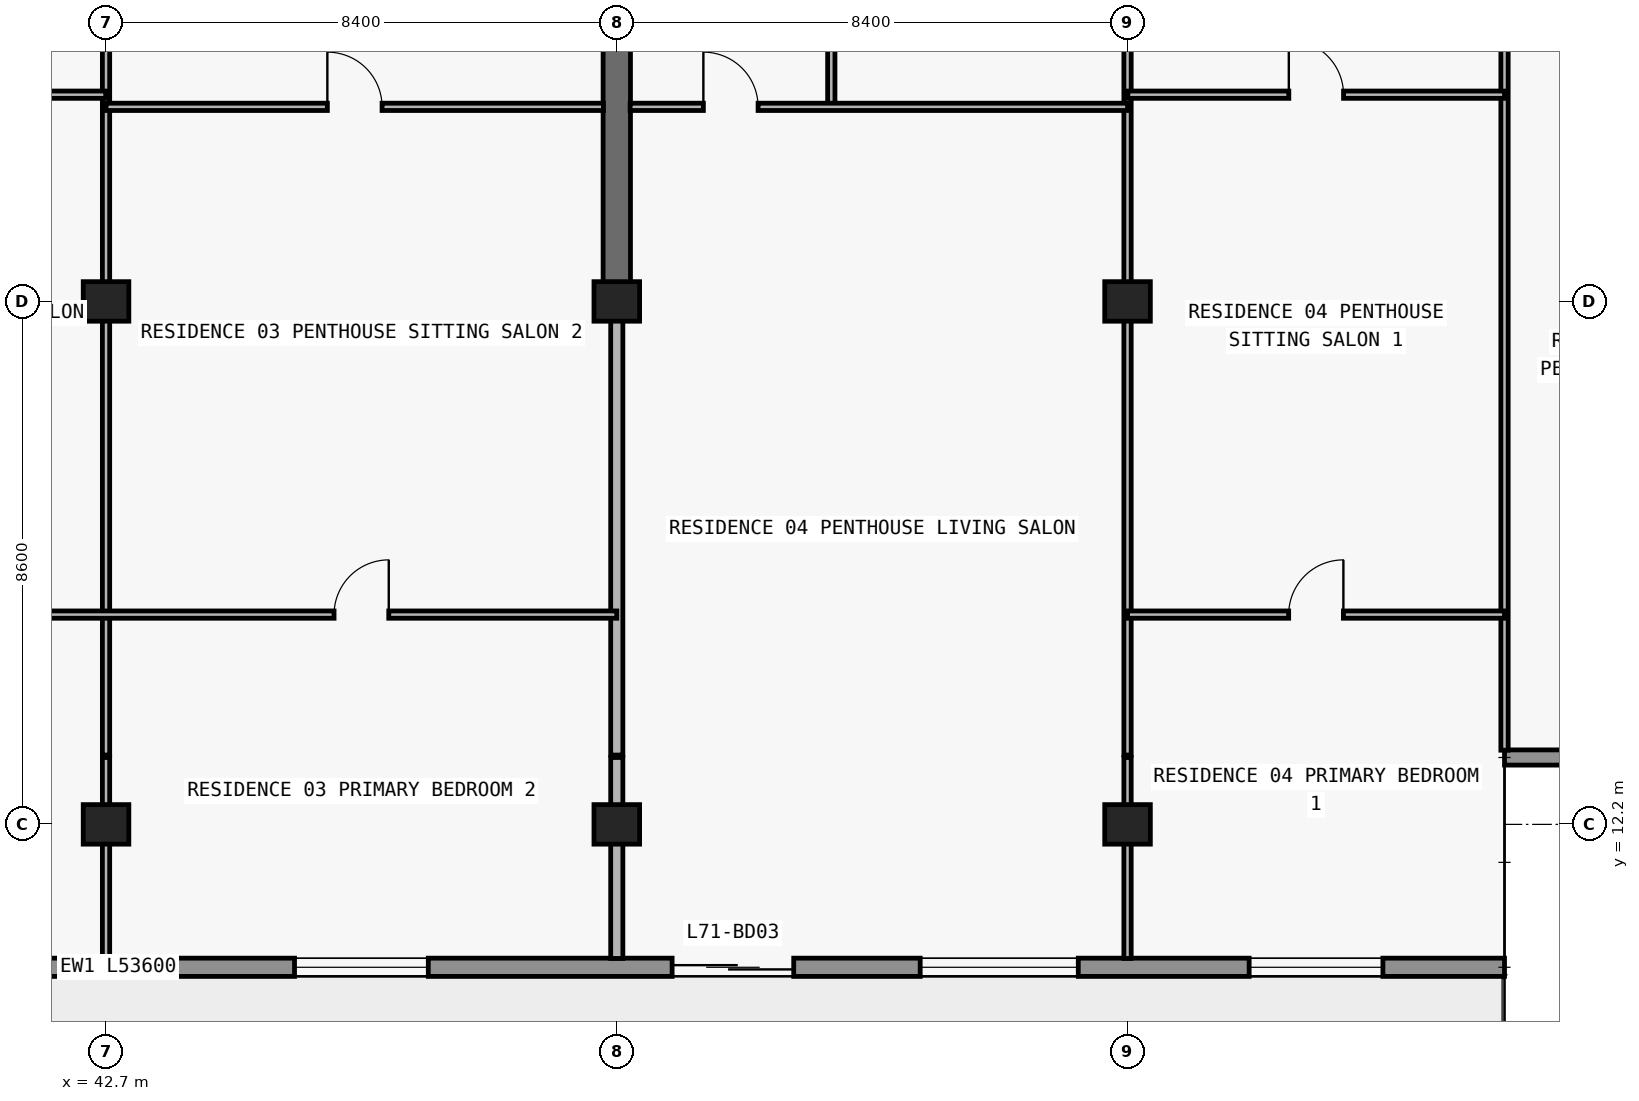
"""IFC4 building model, lengths in metres.
Left out: names, types, materials, properties, quantities, classifications, styles, units other than length and angle.
Written with IfcOpenShell. Run it as: python <this file> out.ifc"""

import sys

from ifc_helpers import new_model, si_unit, direction, frame, frame_2d, origin, origin_2d, place, context, subcontext, project, spatial, rectangle, extrude, element, fill, save


model = new_model("IFC4")
c1 = context("Model", 3, precision=1e-05, world=origin(), true_north=direction((0.0, 1.0)))
c2 = subcontext(c1, "Body", "Model", "MODEL_VIEW")
j1 = project(units=[si_unit("LENGTHUNIT", "METRE"), si_unit("PLANEANGLEUNIT", "RADIAN")], contexts=[c1])
p1 = place(None, origin())
s1 = spatial("IfcSite", under=j1, at=p1, CompositionType="ELEMENT")
p2 = place(p1, origin())
s2 = spatial("IfcBuilding", under=s1, at=p2, CompositionType="ELEMENT")
p3 = place(p2, frame((0.0, 0.0, 252.9)))
s3 = spatial("IfcBuildingStorey", under=s2, at=p3, CompositionType="ELEMENT", Elevation=252.9)
for number, where, z_axis, x_axis in (
    (1, (42.7, 12.2, 0.0), (0.0, 0.0, 1.0), (1.0, 0.0, 0.0)),
    (2, (51.1, 12.2, 0.0), (0.0, 0.0, 1.0), (1.0, 0.0, 0.0)),
    (3, (59.5, 12.2, 0.0), (0.0, 0.0, 1.0), (1.0, 0.0, 0.0)),
    (4, (42.7, 20.8, 0.0), (0.0, 0.0, 1.0), (1.0, 0.0, 0.0)),
    (5, (51.1, 20.8, 0.0), (0.0, 0.0, 1.0), (1.0, 0.0, 0.0)),
    (6, (59.5, 20.8, 0.0), (0.0, 0.0, 1.0), (1.0, 0.0, 0.0)),
):
    element("IfcColumn", number, at=place(p3, frame(where, z_axis=z_axis, x_axis=x_axis)), inside=s3, PredefinedType="COLUMN", context=c2, shape_type="SweptSolid", body=[
        extrude(rectangle(XDim=0.75, YDim=0.65, at=origin_2d()), origin(), (0.0, 0.0, 1.0), 3.05),
    ])
p4 = place(p3, frame((51.1, 20.8, 0.0), z_axis=(0.0, 0.0, 1.0), x_axis=(0.0, 1.0, 0.0)))
e7 = element("IfcWall", 7, at=p4, inside=s3, PredefinedType="SHEAR", context=c2, shape_type="SweptSolid", body=[
    extrude(rectangle(XDim=8.6, YDim=0.45, at=frame_2d((4.3, 0.0))), origin(), (0.0, 0.0, 1.0), 3.05),
])
p5 = place(p3, frame((65.7, 9.85, 0.0), z_axis=(0.0, 0.0, 1.0), x_axis=(-1.0, 0.0, 0.0)))
e8 = element("IfcWall", 8, at=p5, inside=s3, PredefinedType="STANDARD", context=c2, shape_type="SweptSolid", body=[
    extrude(rectangle(XDim=53.6, YDim=0.3, at=frame_2d((26.8, 0.0))), origin(), (0.0, 0.0, 1.0), 3.05),
])
p6 = place(p5, frame((48.05, 0.0, 0.85)))
e9 = element("IfcOpeningElement", 9, at=p6, cuts=e8, PredefinedType="OPENING", context=c2, shape_type="SweptSolid", body=[
    extrude(rectangle(XDim=1.8, YDim=1.55, at=frame_2d((0.9, 0.775))), frame((0.0, 0.16, 0.0), z_axis=(0.0, -1.0, 0.0), x_axis=(1.0, 0.0, 0.0)), (0.0, 0.0, 1.0), 0.32),
])
p7 = place(p5, frame((44.09, 0.0, 0.0)))
e10 = element("IfcOpeningElement", 10, at=p7, cuts=e8, PredefinedType="OPENING", context=c2, shape_type="SweptSolid", body=[
    extrude(rectangle(XDim=2.0, YDim=2.3, at=frame_2d((1.0, 1.15))), frame((0.0, 0.16, 0.0), z_axis=(0.0, -1.0, 0.0), x_axis=(1.0, 0.0, 0.0)), (0.0, 0.0, 1.0), 0.32),
])
p8 = place(p5, frame((39.99, 0.0, 0.85)))
e11 = element("IfcOpeningElement", 11, at=p8, cuts=e8, PredefinedType="OPENING", context=c2, shape_type="SweptSolid", body=[
    extrude(rectangle(XDim=1.8, YDim=1.55, at=frame_2d((0.9, 0.775))), frame((0.0, 0.16, 0.0), z_axis=(0.0, -1.0, 0.0), x_axis=(1.0, 0.0, 0.0)), (0.0, 0.0, 1.0), 0.32),
])
p9 = place(p5, frame((36.09, 0.0, 0.0)))
e12 = element("IfcOpeningElement", 12, at=p9, cuts=e8, PredefinedType="OPENING", context=c2, shape_type="SweptSolid", body=[
    extrude(rectangle(XDim=2.0, YDim=2.3, at=frame_2d((1.0, 1.15))), frame((0.0, 0.16, 0.0), z_axis=(0.0, -1.0, 0.0), x_axis=(1.0, 0.0, 0.0)), (0.0, 0.0, 1.0), 0.32),
])
p10 = place(p5, frame((31.41, 0.0, 0.65)))
e13 = element("IfcOpeningElement", 13, at=p10, cuts=e8, PredefinedType="OPENING", context=c2, shape_type="SweptSolid", body=[
    extrude(rectangle(XDim=2.6, YDim=1.85, at=frame_2d((1.3, 0.925))), frame((0.0, 0.16, 0.0), z_axis=(0.0, -1.0, 0.0), x_axis=(1.0, 0.0, 0.0)), (0.0, 0.0, 1.0), 0.32),
])
p11 = place(p5, frame((25.7, 0.0, 0.85)))
e14 = element("IfcOpeningElement", 14, at=p11, cuts=e8, PredefinedType="OPENING", context=c2, shape_type="SweptSolid", body=[
    extrude(rectangle(XDim=2.2, YDim=1.55, at=frame_2d((1.1, 0.775))), frame((0.0, 0.16, 0.0), z_axis=(0.0, -1.0, 0.0), x_axis=(1.0, 0.0, 0.0)), (0.0, 0.0, 1.0), 0.32),
])
p12 = place(p5, frame((17.7, 0.0, 0.85)))
e15 = element("IfcOpeningElement", 15, at=p12, cuts=e8, PredefinedType="OPENING", context=c2, shape_type="SweptSolid", body=[
    extrude(rectangle(XDim=2.2, YDim=1.55, at=frame_2d((1.1, 0.775))), frame((0.0, 0.16, 0.0), z_axis=(0.0, -1.0, 0.0), x_axis=(1.0, 0.0, 0.0)), (0.0, 0.0, 1.0), 0.32),
])
p13 = place(p5, frame((11.69, 0.0, 0.0)))
e16 = element("IfcOpeningElement", 16, at=p13, cuts=e8, PredefinedType="OPENING", context=c2, shape_type="SweptSolid", body=[
    extrude(rectangle(XDim=2.0, YDim=2.3, at=frame_2d((1.0, 1.15))), frame((0.0, 0.16, 0.0), z_axis=(0.0, -1.0, 0.0), x_axis=(1.0, 0.0, 0.0)), (0.0, 0.0, 1.0), 0.32),
])
p14 = place(p5, frame((7.01, 0.0, 0.65)))
e17 = element("IfcOpeningElement", 17, at=p14, cuts=e8, PredefinedType="OPENING", context=c2, shape_type="SweptSolid", body=[
    extrude(rectangle(XDim=2.6, YDim=1.85, at=frame_2d((1.3, 0.925))), frame((0.0, 0.16, 0.0), z_axis=(0.0, -1.0, 0.0), x_axis=(1.0, 0.0, 0.0)), (0.0, 0.0, 1.0), 0.32),
])
p15 = place(p5, frame((2.0, 0.0, 0.85)))
e18 = element("IfcOpeningElement", 18, at=p15, cuts=e8, PredefinedType="OPENING", context=c2, shape_type="SweptSolid", body=[
    extrude(rectangle(XDim=2.2, YDim=1.55, at=frame_2d((1.1, 0.775))), frame((0.0, 0.16, 0.0), z_axis=(0.0, -1.0, 0.0), x_axis=(1.0, 0.0, 0.0)), (0.0, 0.0, 1.0), 0.32),
])
p16 = place(p3, frame((65.7, 13.3, 0.0), z_axis=(0.0, 0.0, 1.0), x_axis=(1.0, 0.0, 0.0)))
e19 = element("IfcWall", 19, at=p16, inside=s3, PredefinedType="ELEMENTEDWALL", context=c2, shape_type="SweptSolid", body=[
    extrude(rectangle(XDim=3.85, YDim=0.25, at=frame_2d((1.925, 0.0))), origin(), (0.0, 0.0, 1.0), 3.05),
])
p17 = place(p3, frame((42.7, 9.995, 0.0), z_axis=(0.0, 0.0, 1.0), x_axis=(0.0, 1.0, 0.0)))
e20 = element("IfcWall", 20, at=p17, inside=s3, PredefinedType="PARTITIONING", context=c2, shape_type="SweptSolid", body=[
    extrude(rectangle(XDim=3.305, YDim=0.12, at=frame_2d((1.652, 0.0))), origin(), (0.0, 0.0, 1.0), 2.263),
])
p18 = place(p3, frame((42.7, 13.34, 0.0), z_axis=(0.0, 0.0, 1.0), x_axis=(0.0, 1.0, 0.0)))
e21 = element("IfcWall", 21, at=p18, inside=s3, PredefinedType="PARTITIONING", context=c2, shape_type="SweptSolid", body=[
    extrude(rectangle(XDim=16.8, YDim=0.12, at=frame_2d((8.4, 0.0))), origin(), (0.0, 0.0, 1.0), 2.263),
])
p19 = place(p18, frame((12.61, 0.0, 0.0)))
e22 = element("IfcOpeningElement", 22, at=p19, cuts=e21, PredefinedType="OPENING", context=c2, shape_type="SweptSolid", body=[
    extrude(rectangle(XDim=0.9, YDim=2.15, at=frame_2d((0.45, 1.075))), frame((0.0, 0.07, 0.0), z_axis=(0.0, -1.0, 0.0), x_axis=(1.0, 0.0, 0.0)), (0.0, 0.0, 1.0), 0.14),
])
p20 = place(p3, frame((51.1, 9.995, 0.0), z_axis=(0.0, 0.0, 1.0), x_axis=(0.0, 1.0, 0.0)))
e23 = element("IfcWall", 23, at=p20, inside=s3, PredefinedType="PARTITIONING", context=c2, shape_type="SweptSolid", body=[
    extrude(rectangle(XDim=3.305, YDim=0.2, at=frame_2d((1.652, 0.0))), origin(), (0.0, 0.0, 1.0), 2.263),
])
p21 = place(p3, frame((51.1, 13.34, 0.0), z_axis=(0.0, 0.0, 1.0), x_axis=(0.0, 1.0, 0.0)))
e24 = element("IfcWall", 24, at=p21, inside=s3, PredefinedType="PARTITIONING", context=c2, shape_type="SweptSolid", body=[
    extrude(rectangle(XDim=7.455, YDim=0.2, at=frame_2d((3.728, 0.0))), origin(), (0.0, 0.0, 1.0), 2.263),
])
p22 = place(p3, frame((54.628, 24.0, 0.0), z_axis=(0.0, 0.0, 1.0), x_axis=(0.0, 1.0, 0.0)))
e25 = element("IfcWall", 25, at=p22, inside=s3, PredefinedType="PARTITIONING", context=c2, shape_type="SweptSolid", body=[
    extrude(rectangle(XDim=4.8, YDim=0.12, at=frame_2d((2.4, 0.0))), origin(), (0.0, 0.0, 1.0), 3.05),
])
p23 = place(p22, frame((1.95, 0.0, 0.0)))
e26 = element("IfcOpeningElement", 26, at=p23, cuts=e25, PredefinedType="OPENING", context=c2, shape_type="SweptSolid", body=[
    extrude(rectangle(XDim=0.9, YDim=2.15, at=frame_2d((0.45, 1.075))), frame((0.0, 0.07, 0.0), z_axis=(0.0, -1.0, 0.0), x_axis=(1.0, 0.0, 0.0)), (0.0, 0.0, 1.0), 0.14),
])
p24 = place(p3, frame((59.5, 9.995, 0.0), z_axis=(0.0, 0.0, 1.0), x_axis=(0.0, 1.0, 0.0)))
e27 = element("IfcWall", 27, at=p24, inside=s3, PredefinedType="PARTITIONING", context=c2, shape_type="SweptSolid", body=[
    extrude(rectangle(XDim=3.305, YDim=0.12, at=frame_2d((1.652, 0.0))), origin(), (0.0, 0.0, 1.0), 2.263),
])
p25 = place(p3, frame((59.5, 13.34, 0.0), z_axis=(0.0, 0.0, 1.0), x_axis=(0.0, 1.0, 0.0)))
e28 = element("IfcWall", 28, at=p25, inside=s3, PredefinedType="PARTITIONING", context=c2, shape_type="SweptSolid", body=[
    extrude(rectangle(XDim=16.8, YDim=0.12, at=frame_2d((8.4, 0.0))), origin(), (0.0, 0.0, 1.0), 2.263),
])
p26 = place(p25, frame((12.61, 0.0, 0.0)))
e29 = element("IfcOpeningElement", 29, at=p26, cuts=e28, PredefinedType="OPENING", context=c2, shape_type="SweptSolid", body=[
    extrude(rectangle(XDim=0.9, YDim=2.15, at=frame_2d((0.45, 1.075))), frame((0.0, 0.07, 0.0), z_axis=(0.0, -1.0, 0.0), x_axis=(1.0, 0.0, 0.0)), (0.0, 0.0, 1.0), 0.14),
])
p27 = place(p3, frame((65.7, 13.42, 0.0), z_axis=(0.0, 0.0, 1.0), x_axis=(0.0, 1.0, 0.0)))
e30 = element("IfcWall", 30, at=p27, inside=s3, PredefinedType="PARTITIONING", context=c2, shape_type="SweptSolid", body=[
    extrude(rectangle(XDim=16.72, YDim=0.12, at=frame_2d((8.36, 0.0))), origin(), (0.0, 0.0, 1.0), 3.05),
])
p28 = place(p27, frame((12.53, 0.0, 0.0)))
e31 = element("IfcOpeningElement", 31, at=p28, cuts=e30, PredefinedType="OPENING", context=c2, shape_type="SweptSolid", body=[
    extrude(rectangle(XDim=0.9, YDim=2.15, at=frame_2d((0.45, 1.075))), frame((0.0, 0.07, 0.0), z_axis=(0.0, -1.0, 0.0), x_axis=(1.0, 0.0, 0.0)), (0.0, 0.0, 1.0), 0.14),
])
p29 = place(p3, frame((35.1, 15.65, 0.0), z_axis=(0.0, 0.0, 1.0), x_axis=(1.0, 0.0, 0.0)))
e32 = element("IfcWall", 32, at=p29, inside=s3, PredefinedType="PARTITIONING", context=c2, shape_type="SweptSolid", body=[
    extrude(rectangle(XDim=16.0, YDim=0.12, at=frame_2d((8.0, 0.0))), origin(), (0.0, 0.0, 1.0), 3.05),
])
p30 = place(p29, frame((3.35, 0.0, 0.0)))
e33 = element("IfcOpeningElement", 33, at=p30, cuts=e32, PredefinedType="OPENING", context=c2, shape_type="SweptSolid", body=[
    extrude(rectangle(XDim=0.9, YDim=2.15, at=frame_2d((0.45, 1.075))), frame((0.0, 0.07, 0.0), z_axis=(0.0, -1.0, 0.0), x_axis=(1.0, 0.0, 0.0)), (0.0, 0.0, 1.0), 0.14),
])
p31 = place(p29, frame((11.35, 0.0, 0.0)))
e34 = element("IfcOpeningElement", 34, at=p31, cuts=e32, PredefinedType="OPENING", context=c2, shape_type="SweptSolid", body=[
    extrude(rectangle(XDim=0.9, YDim=2.15, at=frame_2d((0.45, 1.075))), frame((0.0, 0.07, 0.0), z_axis=(0.0, -1.0, 0.0), x_axis=(1.0, 0.0, 0.0)), (0.0, 0.0, 1.0), 0.14),
])
p32 = place(p3, frame((59.5, 15.65, 0.0), z_axis=(0.0, 0.0, 1.0), x_axis=(1.0, 0.0, 0.0)))
e35 = element("IfcWall", 35, at=p32, inside=s3, PredefinedType="PARTITIONING", context=c2, shape_type="SweptSolid", body=[
    extrude(rectangle(XDim=6.2, YDim=0.12, at=frame_2d((3.1, 0.0))), origin(), (0.0, 0.0, 1.0), 3.05),
])
p33 = place(p32, frame((2.65, 0.0, 0.0)))
e36 = element("IfcOpeningElement", 36, at=p33, cuts=e35, PredefinedType="OPENING", context=c2, shape_type="SweptSolid", body=[
    extrude(rectangle(XDim=0.9, YDim=2.15, at=frame_2d((0.45, 1.075))), frame((0.0, 0.07, 0.0), z_axis=(0.0, -1.0, 0.0), x_axis=(1.0, 0.0, 0.0)), (0.0, 0.0, 1.0), 0.14),
])
p34 = place(p3, frame((42.7, 24.0, 0.0), z_axis=(0.0, 0.0, 1.0), x_axis=(1.0, 0.0, 0.0)))
e37 = element("IfcWall", 37, at=p34, inside=s3, PredefinedType="PARTITIONING", context=c2, shape_type="SweptSolid", body=[
    extrude(rectangle(XDim=8.18, YDim=0.12, at=frame_2d((4.09, 0.0))), origin(), (0.0, 0.0, 1.0), 3.05),
])
p35 = place(p34, frame((3.64, 0.0, 0.0)))
e38 = element("IfcOpeningElement", 38, at=p35, cuts=e37, PredefinedType="OPENING", context=c2, shape_type="SweptSolid", body=[
    extrude(rectangle(XDim=0.9, YDim=2.15, at=frame_2d((0.45, 1.075))), frame((0.0, 0.07, 0.0), z_axis=(0.0, -1.0, 0.0), x_axis=(1.0, 0.0, 0.0)), (0.0, 0.0, 1.0), 0.14),
])
p36 = place(p3, frame((51.32, 24.0, 0.0), z_axis=(0.0, 0.0, 1.0), x_axis=(1.0, 0.0, 0.0)))
e39 = element("IfcWall", 39, at=p36, inside=s3, PredefinedType="PARTITIONING", context=c2, shape_type="SweptSolid", body=[
    extrude(rectangle(XDim=8.18, YDim=0.12, at=frame_2d((4.09, 0.0))), origin(), (0.0, 0.0, 1.0), 3.05),
])
p37 = place(p36, frame((1.204, 0.0, 0.0)))
e40 = element("IfcOpeningElement", 40, at=p37, cuts=e39, PredefinedType="OPENING", context=c2, shape_type="SweptSolid", body=[
    extrude(rectangle(XDim=0.9, YDim=2.15, at=frame_2d((0.45, 1.075))), frame((0.0, 0.07, 0.0), z_axis=(0.0, -1.0, 0.0), x_axis=(1.0, 0.0, 0.0)), (0.0, 0.0, 1.0), 0.14),
])
p38 = place(p3, frame((35.105, 24.2, 0.0), z_axis=(0.0, 0.0, 1.0), x_axis=(1.0, 0.0, 0.0)))
e41 = element("IfcWall", 41, at=p38, inside=s3, PredefinedType="PARTITIONING", context=c2, shape_type="SweptSolid", body=[
    extrude(rectangle(XDim=7.59, YDim=0.12, at=frame_2d((3.795, 0.0))), origin(), (0.0, 0.0, 1.0), 3.05),
])
p39 = place(p38, frame((3.345, 0.0, 0.0)))
e42 = element("IfcOpeningElement", 42, at=p39, cuts=e41, PredefinedType="OPENING", context=c2, shape_type="SweptSolid", body=[
    extrude(rectangle(XDim=0.9, YDim=2.15, at=frame_2d((0.45, 1.075))), frame((0.0, 0.07, 0.0), z_axis=(0.0, -1.0, 0.0), x_axis=(1.0, 0.0, 0.0)), (0.0, 0.0, 1.0), 0.14),
])
p40 = place(p3, frame((59.505, 24.2, 0.0), z_axis=(0.0, 0.0, 1.0), x_axis=(1.0, 0.0, 0.0)))
e43 = element("IfcWall", 43, at=p40, inside=s3, PredefinedType="PARTITIONING", context=c2, shape_type="SweptSolid", body=[
    extrude(rectangle(XDim=6.195, YDim=0.12, at=frame_2d((3.098, 0.0))), origin(), (0.0, 0.0, 1.0), 3.05),
])
p41 = place(p40, frame((2.647, 0.0, 0.0)))
e44 = element("IfcOpeningElement", 44, at=p41, cuts=e43, PredefinedType="OPENING", context=c2, shape_type="SweptSolid", body=[
    extrude(rectangle(XDim=0.9, YDim=2.15, at=frame_2d((0.45, 1.075))), frame((0.0, 0.07, 0.0), z_axis=(0.0, -1.0, 0.0), x_axis=(1.0, 0.0, 0.0)), (0.0, 0.0, 1.0), 0.14),
])
p42 = place(p12, origin())
e45 = element("IfcWindow", 45, at=p42, inside=s3, PartitioningType="SINGLE_PANEL", PredefinedType="WINDOW", context=c2, shape_type="SweptSolid", body=[
    extrude(rectangle(XDim=2.2, YDim=1.55, at=frame_2d((1.1, 0.775))), frame((0.0, 0.03, 0.0), z_axis=(0.0, -1.0, 0.0), x_axis=(1.0, 0.0, 0.0)), (0.0, 0.0, 1.0), 0.06),
])
fill(e15, e45)
p43 = place(p13, origin())
e46 = element("IfcDoor", 46, at=p43, inside=s3, OperationType="DOUBLE_DOOR_SLIDING", PredefinedType="DOOR", context=c2, shape_type="SweptSolid", body=[
    extrude(rectangle(XDim=2.0, YDim=2.3, at=frame_2d((1.0, 1.15))), frame((0.0, 0.025, 0.0), z_axis=(0.0, -1.0, 0.0), x_axis=(1.0, 0.0, 0.0)), (0.0, 0.0, 1.0), 0.05),
])
fill(e16, e46)
p44 = place(p14, origin())
e47 = element("IfcWindow", 47, at=p44, inside=s3, PartitioningType="SINGLE_PANEL", PredefinedType="WINDOW", context=c2, shape_type="SweptSolid", body=[
    extrude(rectangle(XDim=2.6, YDim=1.85, at=frame_2d((1.3, 0.925))), frame((0.0, 0.03, 0.0), z_axis=(0.0, -1.0, 0.0), x_axis=(1.0, 0.0, 0.0)), (0.0, 0.0, 1.0), 0.06),
])
fill(e17, e47)
p45 = place(p15, origin())
e48 = element("IfcWindow", 48, at=p45, inside=s3, PartitioningType="SINGLE_PANEL", PredefinedType="WINDOW", context=c2, shape_type="SweptSolid", body=[
    extrude(rectangle(XDim=2.2, YDim=1.55, at=frame_2d((1.1, 0.775))), frame((0.0, 0.03, 0.0), z_axis=(0.0, -1.0, 0.0), x_axis=(1.0, 0.0, 0.0)), (0.0, 0.0, 1.0), 0.06),
])
fill(e18, e48)
p46 = place(p35, origin())
e49 = element("IfcDoor", 49, at=p46, inside=s3, OperationType="SINGLE_SWING_LEFT", PredefinedType="DOOR", context=c2, shape_type="SweptSolid", body=[
    extrude(rectangle(XDim=0.9, YDim=2.15, at=frame_2d((0.45, 1.075))), frame((0.0, 0.025, 0.0), z_axis=(0.0, -1.0, 0.0), x_axis=(1.0, 0.0, 0.0)), (0.0, 0.0, 1.0), 0.05),
])
fill(e38, e49)
p47 = place(p31, origin())
e50 = element("IfcDoor", 50, at=p47, inside=s3, OperationType="SINGLE_SWING_RIGHT", PredefinedType="DOOR", context=c2, shape_type="SweptSolid", body=[
    extrude(rectangle(XDim=0.9, YDim=2.15, at=frame_2d((0.45, 1.075))), frame((0.0, 0.025, 0.0), z_axis=(0.0, -1.0, 0.0), x_axis=(1.0, 0.0, 0.0)), (0.0, 0.0, 1.0), 0.05),
])
fill(e34, e50)
p48 = place(p37, origin())
e51 = element("IfcDoor", 51, at=p48, inside=s3, OperationType="SINGLE_SWING_LEFT", PredefinedType="DOOR", context=c2, shape_type="SweptSolid", body=[
    extrude(rectangle(XDim=0.9, YDim=2.15, at=frame_2d((0.45, 1.075))), frame((0.0, 0.025, 0.0), z_axis=(0.0, -1.0, 0.0), x_axis=(1.0, 0.0, 0.0)), (0.0, 0.0, 1.0), 0.05),
])
fill(e40, e51)
p49 = place(p41, origin())
e52 = element("IfcDoor", 52, at=p49, inside=s3, OperationType="SINGLE_SWING_LEFT", PredefinedType="DOOR", context=c2, shape_type="SweptSolid", body=[
    extrude(rectangle(XDim=0.9, YDim=2.15, at=frame_2d((0.45, 1.075))), frame((0.0, 0.025, 0.0), z_axis=(0.0, -1.0, 0.0), x_axis=(1.0, 0.0, 0.0)), (0.0, 0.0, 1.0), 0.05),
])
fill(e44, e52)
p50 = place(p33, origin())
e53 = element("IfcDoor", 53, at=p50, inside=s3, OperationType="SINGLE_SWING_RIGHT", PredefinedType="DOOR", context=c2, shape_type="SweptSolid", body=[
    extrude(rectangle(XDim=0.9, YDim=2.15, at=frame_2d((0.45, 1.075))), frame((0.0, 0.025, 0.0), z_axis=(0.0, -1.0, 0.0), x_axis=(1.0, 0.0, 0.0)), (0.0, 0.0, 1.0), 0.05),
])
fill(e36, e53)
save(model, sys.argv[1])
